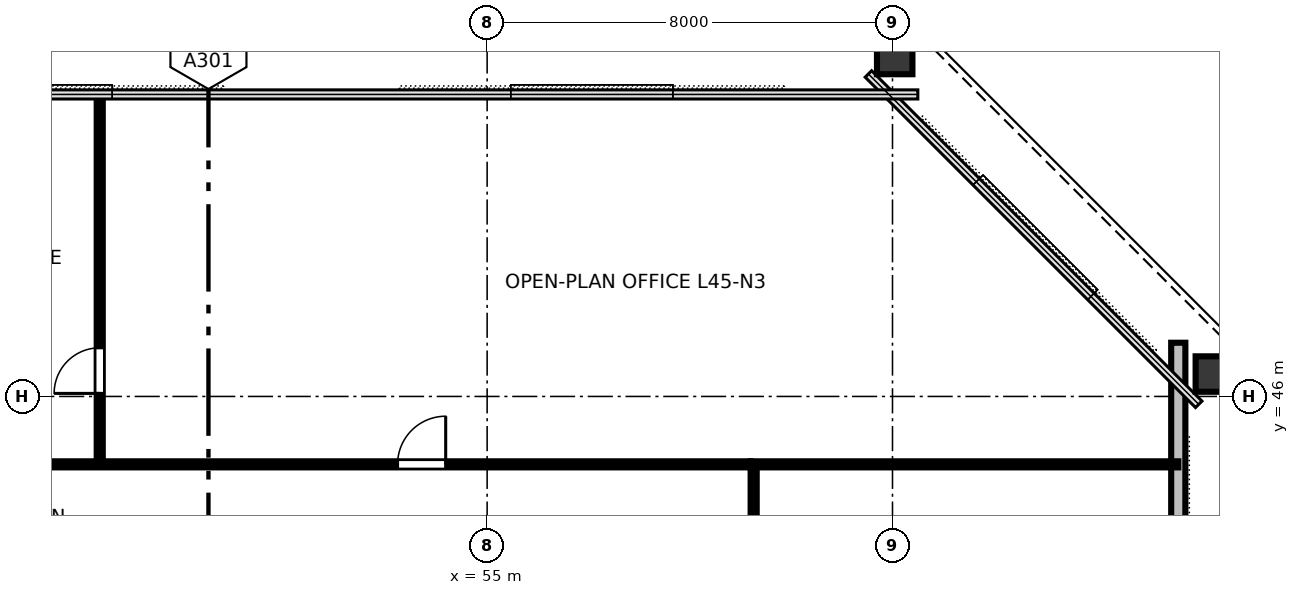
"""IFC4 building model, lengths in metres.
Left out: names, types, materials, properties, quantities, classifications, styles, units other than length and angle.
Written with IfcOpenShell. Run it as: python <this file> out.ifc"""

import sys

from ifc_helpers import new_model, si_unit, direction, frame, frame_2d, origin, origin_2d, place, context, subcontext, project, spatial, rectangle, hollow_rectangle, extrude, element, fill, save


model = new_model("IFC4")
c1 = context("Model", 3, precision=1e-05, world=origin(), true_north=direction((0.0, 1.0)))
c2 = subcontext(c1, "Body", "Model", "MODEL_VIEW")
j1 = project(units=[si_unit("LENGTHUNIT", "METRE"), si_unit("PLANEANGLEUNIT", "RADIAN")], contexts=[c1])
p1 = place(None, origin())
s1 = spatial("IfcSite", under=j1, at=p1, CompositionType="ELEMENT")
p2 = place(p1, origin())
s2 = spatial("IfcBuilding", under=s1, at=p2, CompositionType="ELEMENT")
p3 = place(p2, frame((0.0, 0.0, 172.0)))
s3 = spatial("IfcBuildingStorey", under=s2, at=p3, CompositionType="ELEMENT", Elevation=172.0)
p4 = place(p3, frame((69.407, 46.442, 0.0), z_axis=(-0.054739996676, -0.054074931296, 0.997035322629), x_axis=(0.709306139229, 0.700688401089, 0.076945210577)))
e1 = element("IfcColumn", 1, at=p4, inside=s3, PredefinedType="COLUMN", context=c2, shape_type="SweptSolid", body=[
    extrude(hollow_rectangle(XDim=0.7, YDim=0.85, WallThickness=0.04, at=origin_2d()), origin(), (0.0, 0.0, 1.0), 4.772),
])
p5 = place(p3, frame((63.043, 52.783, 0.0), z_axis=(-0.062460790535, -0.046397982813, 0.996968342946), x_axis=(0.596311896623, -0.802752839886, 0.0)))
e2 = element("IfcColumn", 2, at=p5, inside=s3, PredefinedType="COLUMN", context=c2, shape_type="SweptSolid", body=[
    extrude(hollow_rectangle(XDim=0.7, YDim=0.85, WallThickness=0.04, at=origin_2d()), origin(), (0.0, 0.0, 1.0), 4.772),
])
p6 = place(p3, frame((68.64, 16.94, 0.0), z_axis=(0.0, 0.0, 1.0), x_axis=(0.0, 1.0, 0.0)))
e3 = element("IfcWall", 3, at=p6, inside=s3, PredefinedType="STANDARD", context=c2, shape_type="SweptSolid", body=[
    extrude(rectangle(XDim=30.12, YDim=0.28, at=frame_2d((15.06, 0.0))), origin(), (0.0, 0.0, 1.0), 4.76),
])
p7 = place(p6, frame((16.56, 0.0, 0.0)))
e4 = element("IfcOpeningElement", 4, at=p7, cuts=e3, PredefinedType="OPENING", context=c2, shape_type="SweptSolid", body=[
    extrude(rectangle(XDim=1.8, YDim=2.2, at=frame_2d((0.9, 1.1))), frame((0.0, 0.15, 0.0), z_axis=(0.0, -1.0, 0.0), x_axis=(1.0, 0.0, 0.0)), (0.0, 0.0, 1.0), 0.3),
])
p8 = place(p6, frame((6.083, 0.0, 0.8)))
e5 = element("IfcOpeningElement", 5, at=p8, cuts=e3, PredefinedType="OPENING", context=c2, shape_type="SweptSolid", body=[
    extrude(rectangle(XDim=2.0, YDim=1.95, at=frame_2d((1.0, 0.975))), frame((0.0, 0.15, 0.0), z_axis=(0.0, -1.0, 0.0), x_axis=(1.0, 0.0, 0.0)), (0.0, 0.0, 1.0), 0.3),
])
p9 = place(p6, frame((10.071, 0.0, 0.8)))
e6 = element("IfcOpeningElement", 6, at=p9, cuts=e3, PredefinedType="OPENING", context=c2, shape_type="SweptSolid", body=[
    extrude(rectangle(XDim=2.0, YDim=1.95, at=frame_2d((1.0, 0.975))), frame((0.0, 0.15, 0.0), z_axis=(0.0, -1.0, 0.0), x_axis=(1.0, 0.0, 0.0)), (0.0, 0.0, 1.0), 0.3),
])
p10 = place(p6, frame((22.037, 0.0, 0.8)))
e7 = element("IfcOpeningElement", 7, at=p10, cuts=e3, PredefinedType="OPENING", context=c2, shape_type="SweptSolid", body=[
    extrude(rectangle(XDim=2.0, YDim=1.95, at=frame_2d((1.0, 0.975))), frame((0.0, 0.15, 0.0), z_axis=(0.0, -1.0, 0.0), x_axis=(1.0, 0.0, 0.0)), (0.0, 0.0, 1.0), 0.3),
])
p11 = place(p3, frame((47.354, 44.66, 0.0), z_axis=(0.0, 0.0, 1.0), x_axis=(0.0, 1.0, 0.0)))
e8 = element("IfcWall", 8, at=p11, inside=s3, PredefinedType="PARTITIONING", context=c2, shape_type="SweptSolid", body=[
    extrude(rectangle(XDim=7.3, YDim=0.12, at=frame_2d((3.65, 0.0))), origin(), (0.0, 0.0, 1.0), 4.04),
])
p12 = place(p11, frame((1.4, 0.0, 0.0)))
e9 = element("IfcOpeningElement", 9, at=p12, cuts=e8, PredefinedType="OPENING", context=c2, shape_type="SweptSolid", body=[
    extrude(rectangle(XDim=0.9, YDim=2.15, at=frame_2d((0.45, 1.075))), frame((0.0, 0.07, 0.0), z_axis=(0.0, -1.0, 0.0), x_axis=(1.0, 0.0, 0.0)), (0.0, 0.0, 1.0), 0.14),
])
p13 = place(p3, frame((31.8, 44.66, 0.0), z_axis=(0.0, 0.0, 1.0), x_axis=(1.0, 0.0, 0.0)))
e10 = element("IfcWall", 10, at=p13, inside=s3, PredefinedType="PARTITIONING", context=c2, shape_type="SweptSolid", body=[
    extrude(rectangle(XDim=28.4, YDim=0.12, at=frame_2d((14.2, 0.0))), origin(), (0.0, 0.0, 1.0), 4.04),
])
p14 = place(p13, frame((4.347, 0.0, 0.0)))
e11 = element("IfcOpeningElement", 11, at=p14, cuts=e10, PredefinedType="OPENING", context=c2, shape_type="SweptSolid", body=[
    extrude(rectangle(XDim=0.95, YDim=2.15, at=frame_2d((0.475, 1.075))), frame((0.0, 0.07, 0.0), z_axis=(0.0, -1.0, 0.0), x_axis=(1.0, 0.0, 0.0)), (0.0, 0.0, 1.0), 0.14),
])
p15 = place(p13, frame((12.055, 0.0, 0.0)))
e12 = element("IfcOpeningElement", 12, at=p15, cuts=e10, PredefinedType="OPENING", context=c2, shape_type="SweptSolid", body=[
    extrude(rectangle(XDim=0.95, YDim=2.15, at=frame_2d((0.475, 1.075))), frame((0.0, 0.07, 0.0), z_axis=(0.0, -1.0, 0.0), x_axis=(1.0, 0.0, 0.0)), (0.0, 0.0, 1.0), 0.14),
])
p16 = place(p13, frame((21.432, 0.0, 0.0)))
e13 = element("IfcOpeningElement", 13, at=p16, cuts=e10, PredefinedType="OPENING", context=c2, shape_type="SweptSolid", body=[
    extrude(rectangle(XDim=0.95, YDim=2.15, at=frame_2d((0.475, 1.075))), frame((0.0, 0.07, 0.0), z_axis=(0.0, -1.0, 0.0), x_axis=(1.0, 0.0, 0.0)), (0.0, 0.0, 1.0), 0.14),
])
p17 = place(p3, frame((60.26, 33.02, 0.0), z_axis=(0.0, 0.0, 1.0), x_axis=(0.0, 1.0, 0.0)))
e14 = element("IfcWall", 14, at=p17, inside=s3, PredefinedType="PARTITIONING", context=c2, shape_type="SweptSolid", body=[
    extrude(rectangle(XDim=11.58, YDim=0.12, at=frame_2d((5.79, 0.0))), origin(), (0.0, 0.0, 1.0), 4.04),
])
p18 = place(p17, frame((1.471, 0.0, 0.0)))
e15 = element("IfcOpeningElement", 15, at=p18, cuts=e14, PredefinedType="OPENING", context=c2, shape_type="SweptSolid", body=[
    extrude(rectangle(XDim=0.95, YDim=2.15, at=frame_2d((0.475, 1.075))), frame((0.0, 0.07, 0.0), z_axis=(0.0, -1.0, 0.0), x_axis=(1.0, 0.0, 0.0)), (0.0, 0.0, 1.0), 0.14),
])
p19 = place(p17, frame((7.161, 0.0, 0.0)))
e16 = element("IfcOpeningElement", 16, at=p19, cuts=e14, PredefinedType="OPENING", context=c2, shape_type="SweptSolid", body=[
    extrude(rectangle(XDim=0.95, YDim=2.15, at=frame_2d((0.475, 1.075))), frame((0.0, 0.07, 0.0), z_axis=(0.0, -1.0, 0.0), x_axis=(1.0, 0.0, 0.0)), (0.0, 0.0, 1.0), 0.14),
])
p20 = place(p3, frame((60.2, 44.66, 0.0), z_axis=(0.0, 0.0, 1.0), x_axis=(1.0, 0.0, 0.0)))
e17 = element("IfcWall", 17, at=p20, inside=s3, PredefinedType="PARTITIONING", context=c2, shape_type="SweptSolid", body=[
    extrude(rectangle(XDim=8.44, YDim=0.12, at=frame_2d((4.22, 0.0))), origin(), (0.0, 0.0, 1.0), 4.04),
])
p21 = place(p12, origin())
e18 = element("IfcDoor", 18, at=p21, inside=s3, OperationType="SINGLE_SWING_LEFT", PredefinedType="DOOR", context=c2, shape_type="SweptSolid", body=[
    extrude(rectangle(XDim=0.9, YDim=2.15, at=frame_2d((0.45, 1.075))), frame((0.0, 0.025, 0.0), z_axis=(0.0, -1.0, 0.0), x_axis=(1.0, 0.0, 0.0)), (0.0, 0.0, 1.0), 0.05),
])
fill(e9, e18)
p22 = place(p16, origin())
e19 = element("IfcDoor", 19, at=p22, inside=s3, OperationType="SINGLE_SWING_RIGHT", PredefinedType="DOOR", context=c2, shape_type="SweptSolid", body=[
    extrude(rectangle(XDim=0.95, YDim=2.15, at=frame_2d((0.475, 1.075))), frame((0.0, 0.025, 0.0), z_axis=(0.0, -1.0, 0.0), x_axis=(1.0, 0.0, 0.0)), (0.0, 0.0, 1.0), 0.05),
])
fill(e13, e19)
save(model, sys.argv[1])
